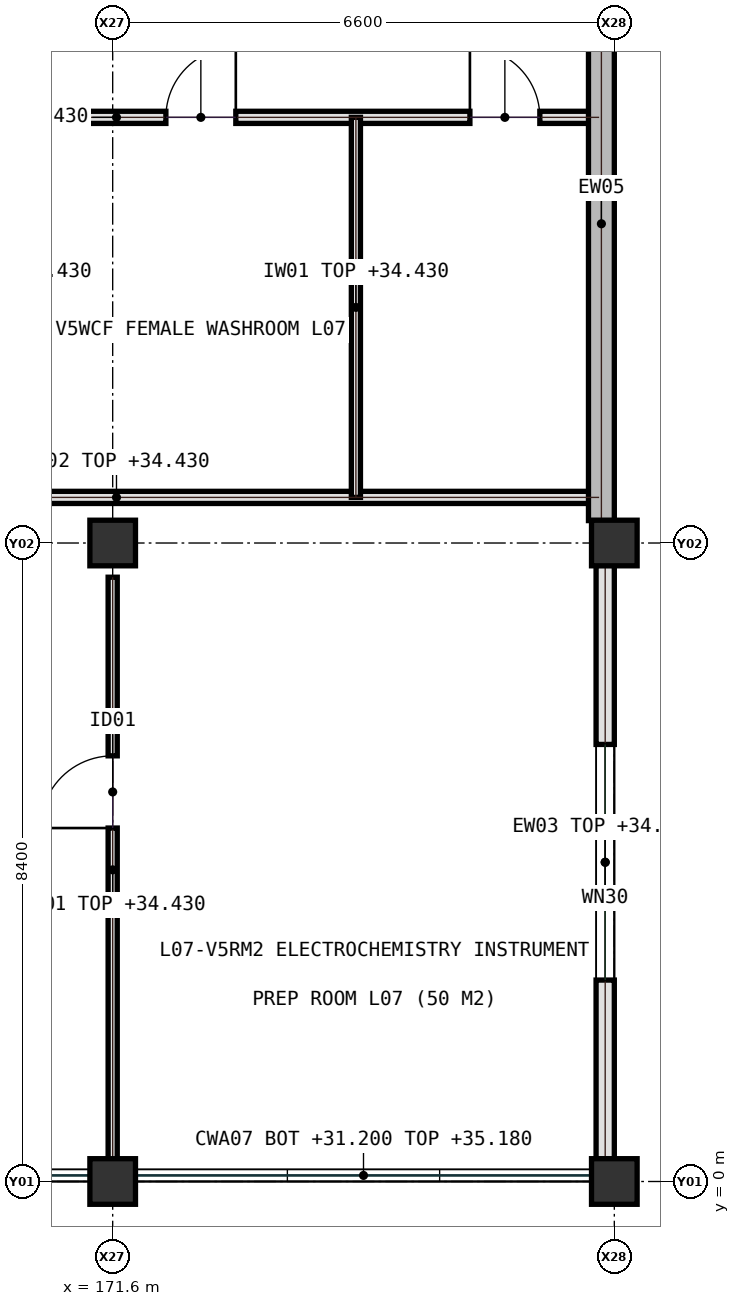
"""IFC4 building model, lengths in metres.
Left out: names, types, materials, properties, quantities, classifications, styles, units other than length and angle.
Written with IfcOpenShell. Run it as: python <this file> out.ifc"""

import sys

from ifc_helpers import new_model, si_unit, direction, frame, frame_2d, origin, origin_2d, place, context, subcontext, project, spatial, rectangle, extrude, element, fill, save


model = new_model("IFC4")
c1 = context("Model", 3, precision=1e-05, world=origin(), true_north=direction((0.0, 1.0)))
c2 = subcontext(c1, "Body", "Model", "MODEL_VIEW")
j1 = project(units=[si_unit("LENGTHUNIT", "METRE"), si_unit("PLANEANGLEUNIT", "RADIAN")], contexts=[c1])
p1 = place(None, origin())
s1 = spatial("IfcSite", under=j1, at=p1, CompositionType="ELEMENT")
p2 = place(p1, origin())
s2 = spatial("IfcBuilding", under=s1, at=p2, CompositionType="ELEMENT")
p3 = place(p2, frame((0.0, 0.0, 31.2)))
s3 = spatial("IfcBuildingStorey", under=s2, at=p3, CompositionType="ELEMENT", Elevation=31.2)
for number, where, z_axis, x_axis in (
    (1, (171.6, 0.0, 0.0), (0.0, 0.0, 1.0), (1.0, 0.0, 0.0)),
    (2, (171.6, 8.4, 0.0), (0.0, 0.0, 1.0), (1.0, 0.0, 0.0)),
    (3, (178.2, 0.0, 0.0), (0.0, 0.0, 1.0), (1.0, 0.0, 0.0)),
    (4, (178.2, 8.4, 0.0), (0.0, 0.0, 1.0), (1.0, 0.0, 0.0)),
):
    element("IfcColumn", number, at=place(p3, frame(where, z_axis=z_axis, x_axis=x_axis)), inside=s3, PredefinedType="COLUMN", context=c2, shape_type="SweptSolid", body=[
        extrude(rectangle(XDim=0.6, YDim=0.6, at=origin_2d()), origin(), (0.0, 0.0, 1.0), 4.2),
    ])
p4 = place(p3, frame((165.3, 14.0, 0.0), z_axis=(0.0, 0.0, 1.0), x_axis=(1.0, 0.0, 0.0)))
e5 = element("IfcWall", 5, at=p4, inside=s3, PredefinedType="PARTITIONING", context=c2, shape_type="SweptSolid", body=[
    extrude(rectangle(XDim=12.7, YDim=0.16, at=frame_2d((6.35, 0.0))), origin(), (0.0, 0.0, 1.0), 3.23),
])
p5 = place(p4, frame((2.2, 0.0, 0.0)))
e6 = element("IfcOpeningElement", 6, at=p5, cuts=e5, PredefinedType="OPENING", context=c2, shape_type="SweptSolid", body=[
    extrude(rectangle(XDim=0.92, YDim=2.08, at=frame_2d((0.46, 1.04))), frame((0.0, 0.09, 0.0), z_axis=(0.0, -1.0, 0.0), x_axis=(1.0, 0.0, 0.0)), (0.0, 0.0, 1.0), 0.18),
])
p6 = place(p4, frame((7.0, 0.0, 0.0)))
e7 = element("IfcOpeningElement", 7, at=p6, cuts=e5, PredefinedType="OPENING", context=c2, shape_type="SweptSolid", body=[
    extrude(rectangle(XDim=0.92, YDim=2.08, at=frame_2d((0.46, 1.04))), frame((0.0, 0.09, 0.0), z_axis=(0.0, -1.0, 0.0), x_axis=(1.0, 0.0, 0.0)), (0.0, 0.0, 1.0), 0.18),
])
p7 = place(p4, frame((11.0, 0.0, 0.0)))
e8 = element("IfcOpeningElement", 8, at=p7, cuts=e5, PredefinedType="OPENING", context=c2, shape_type="SweptSolid", body=[
    extrude(rectangle(XDim=0.92, YDim=2.08, at=frame_2d((0.46, 1.04))), frame((0.0, 0.09, 0.0), z_axis=(0.0, -1.0, 0.0), x_axis=(1.0, 0.0, 0.0)), (0.0, 0.0, 1.0), 0.18),
])
p8 = place(p3, frame((165.3, 9.0, 0.0), z_axis=(0.0, 0.0, 1.0), x_axis=(1.0, 0.0, 0.0)))
e9 = element("IfcWall", 9, at=p8, inside=s3, PredefinedType="PARTITIONING", context=c2, shape_type="SweptSolid", body=[
    extrude(rectangle(XDim=12.7, YDim=0.16, at=frame_2d((6.35, 0.0))), origin(), (0.0, 0.0, 1.0), 3.23),
])
p9 = place(p3, frame((174.8, 9.0, 0.0), z_axis=(0.0, 0.0, 1.0), x_axis=(0.0, 1.0, 0.0)))
e10 = element("IfcWall", 10, at=p9, inside=s3, PredefinedType="PARTITIONING", context=c2, shape_type="SweptSolid", body=[
    extrude(rectangle(XDim=5.0, YDim=0.12, at=frame_2d((2.5, 0.0))), origin(), (0.0, 0.0, 1.0), 3.23),
])
p10 = place(p3, frame((171.6, 0.25, 0.0), z_axis=(0.0, 0.0, 1.0), x_axis=(0.0, 1.0, 0.0)))
e11 = element("IfcWall", 11, at=p10, inside=s3, PredefinedType="PARTITIONING", context=c2, shape_type="SweptSolid", body=[
    extrude(rectangle(XDim=7.7, YDim=0.12, at=frame_2d((3.85, 0.0))), origin(), (0.0, 0.0, 1.0), 3.23),
])
p11 = place(p10, frame((4.4, 0.0, 0.0)))
e12 = element("IfcOpeningElement", 12, at=p11, cuts=e11, PredefinedType="OPENING", context=c2, shape_type="SweptSolid", body=[
    extrude(rectangle(XDim=0.95, YDim=2.15, at=frame_2d((0.475, 1.075))), frame((0.0, 0.07, 0.0), z_axis=(0.0, -1.0, 0.0), x_axis=(1.0, 0.0, 0.0)), (0.0, 0.0, 1.0), 0.14),
])
p12 = place(p3, frame((178.08, 0.295, 0.0), z_axis=(0.0, 0.0, 1.0), x_axis=(0.0, 1.0, 0.0)))
e13 = element("IfcWall", 13, at=p12, inside=s3, PredefinedType="SOLIDWALL", context=c2, shape_type="SweptSolid", body=[
    extrude(rectangle(XDim=7.81, YDim=0.24, at=frame_2d((3.905, 0.0))), origin(), (0.0, 0.0, 1.0), 3.265),
])
p13 = place(p12, frame((2.355, 0.0, 0.95)))
e14 = element("IfcOpeningElement", 14, at=p13, cuts=e13, PredefinedType="OPENING", context=c2, shape_type="SweptSolid", body=[
    extrude(rectangle(XDim=3.1, YDim=2.05, at=frame_2d((1.55, 1.025))), frame((0.0, 0.13, 0.0), z_axis=(0.0, -1.0, 0.0), x_axis=(1.0, 0.0, 0.0)), (0.0, 0.0, 1.0), 0.26),
])
p14 = place(p3, frame((178.03, 8.695, 0.0), z_axis=(0.0, 0.0, 1.0), x_axis=(0.0, 1.0, 0.0)))
e15 = element("IfcWall", 15, at=p14, inside=s3, PredefinedType="SHEAR", context=c2, shape_type="SweptSolid", body=[
    extrude(rectangle(XDim=7.81, YDim=0.34, at=frame_2d((3.905, 0.0))), origin(), (0.0, 0.0, 1.0), 3.98),
])
p15 = place(p6, origin())
e16 = element("IfcDoor", 16, at=p15, inside=s3, OperationType="SINGLE_SWING_RIGHT", PredefinedType="DOOR", context=c2, shape_type="SweptSolid", body=[
    extrude(rectangle(XDim=0.92, YDim=2.08, at=frame_2d((0.46, 1.04))), frame((0.0, 0.025, 0.0), z_axis=(0.0, -1.0, 0.0), x_axis=(1.0, 0.0, 0.0)), (0.0, 0.0, 1.0), 0.05),
])
fill(e7, e16)
p16 = place(p7, origin())
e17 = element("IfcDoor", 17, at=p16, inside=s3, OperationType="SINGLE_SWING_LEFT", PredefinedType="DOOR", context=c2, shape_type="SweptSolid", body=[
    extrude(rectangle(XDim=0.92, YDim=2.08, at=frame_2d((0.46, 1.04))), frame((0.0, 0.025, 0.0), z_axis=(0.0, -1.0, 0.0), x_axis=(1.0, 0.0, 0.0)), (0.0, 0.0, 1.0), 0.05),
])
fill(e8, e17)
p17 = place(p11, origin())
e18 = element("IfcDoor", 18, at=p17, inside=s3, OperationType="SINGLE_SWING_LEFT", PredefinedType="DOOR", context=c2, shape_type="SweptSolid", body=[
    extrude(rectangle(XDim=0.95, YDim=2.15, at=frame_2d((0.475, 1.075))), frame((0.0, 0.025, 0.0), z_axis=(0.0, -1.0, 0.0), x_axis=(1.0, 0.0, 0.0)), (0.0, 0.0, 1.0), 0.05),
])
fill(e12, e18)
p18 = place(p13, origin())
e19 = element("IfcWindow", 19, at=p18, inside=s3, PartitioningType="SINGLE_PANEL", PredefinedType="WINDOW", context=c2, shape_type="SweptSolid", body=[
    extrude(rectangle(XDim=3.1, YDim=2.05, at=frame_2d((1.55, 1.025))), frame((0.0, 0.03, 0.0), z_axis=(0.0, -1.0, 0.0), x_axis=(1.0, 0.0, 0.0)), (0.0, 0.0, 1.0), 0.06),
])
fill(e14, e19)
save(model, sys.argv[1])
